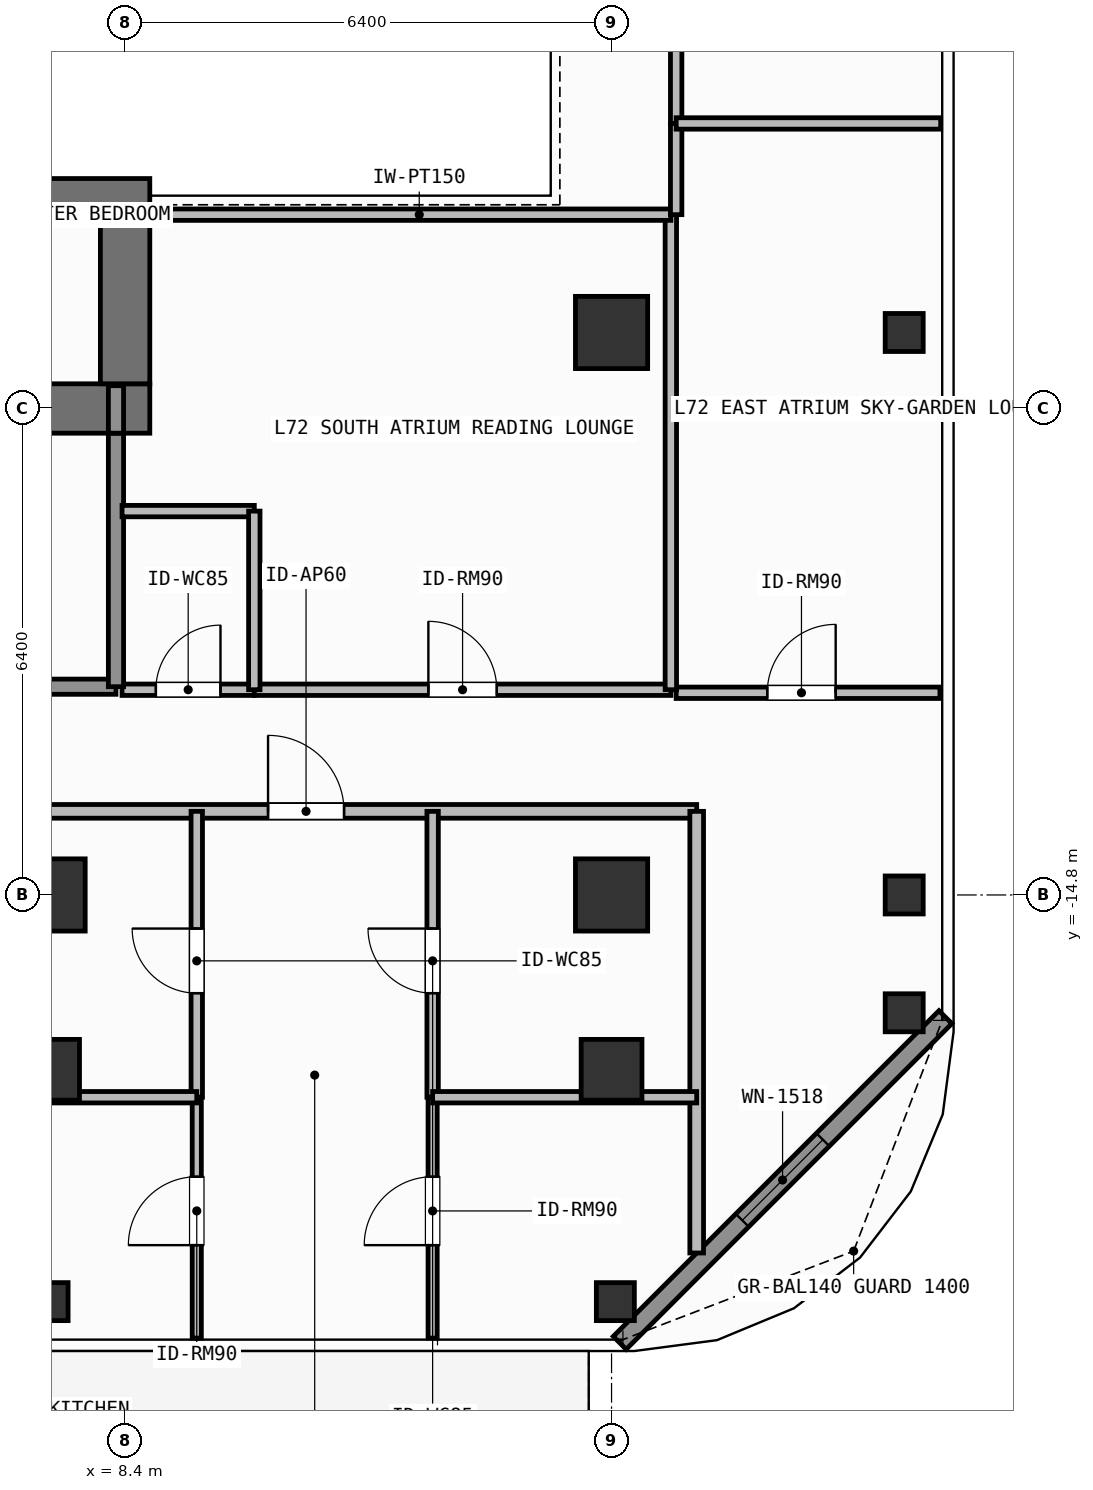
"""IFC4 building model, lengths in metres.
Left out: names, types, materials, properties, quantities, classifications, styles, units other than length and angle.
Written with IfcOpenShell. Run it as: python <this file> out.ifc"""

import sys

from ifc_helpers import new_model, si_unit, direction, frame, frame_2d, origin, origin_2d, place, context, subcontext, project, spatial, rectangle, hollow_rectangle, extrude, element, fill, save


model = new_model("IFC4")
c1 = context("Model", 3, precision=1e-05, world=origin(), true_north=direction((0.0, 1.0)))
c2 = subcontext(c1, "Body", "Model", "MODEL_VIEW")
j1 = project(units=[si_unit("LENGTHUNIT", "METRE"), si_unit("PLANEANGLEUNIT", "RADIAN")], contexts=[c1])
p1 = place(None, origin())
s1 = spatial("IfcSite", under=j1, at=p1, CompositionType="ELEMENT")
p2 = place(p1, origin())
s2 = spatial("IfcBuilding", under=s1, at=p2, CompositionType="ELEMENT")
p3 = place(p2, frame((0.0, 0.0, 293.7)))
s3 = spatial("IfcBuildingStorey", under=s2, at=p3, CompositionType="ELEMENT", Elevation=293.7)
p4 = place(p3, frame((6.12, -8.4, 0.0), z_axis=(0.0, 0.0, 1.0), x_axis=(1.0, 0.0, 0.0)))
e1 = element("IfcWall", 1, at=p4, inside=s3, PredefinedType="SHEAR", context=c2, shape_type="SweptSolid", body=[
    extrude(rectangle(XDim=2.605, YDim=0.65, at=frame_2d((1.302, 0.0))), origin(), (0.0, 0.0, 1.0), 3.9),
])
p5 = place(p3, frame((8.4, -8.075, 0.0), z_axis=(0.0, 0.0, 1.0), x_axis=(0.0, 1.0, 0.0)))
e2 = element("IfcWall", 2, at=p5, inside=s3, PredefinedType="SHEAR", context=c2, shape_type="SweptSolid", body=[
    extrude(rectangle(XDim=2.25, YDim=0.65, at=frame_2d((1.125, 0.0))), origin(), (0.0, 0.0, 1.0), 3.9),
])
p6 = place(p3, frame((3.045, -5.6, 0.0), z_axis=(0.0, 0.0, 1.0), x_axis=(1.0, 0.0, 0.0)))
e3 = element("IfcWall", 3, at=p6, inside=s3, PredefinedType="SHEAR", context=c2, shape_type="SweptSolid", body=[
    extrude(rectangle(XDim=5.68, YDim=0.45, at=frame_2d((2.84, 0.0))), origin(), (0.0, 0.0, 1.0), 3.9),
])
for number, where, z_axis, x_axis in (
    (4, (7.4, -14.8, 0.0), (0.0, 0.0, 1.0), (1.0, 0.0, 0.0)),
    (5, (14.8, -14.8, 0.0), (0.0, 0.0, 1.0), (1.0, 0.0, 0.0)),
    (6, (14.8, -7.4, 0.0), (0.0, 0.0, 1.0), (1.0, 0.0, 0.0)),
):
    element("IfcColumn", number, at=place(p3, frame(where, z_axis=z_axis, x_axis=x_axis)), inside=s3, PredefinedType="COLUMN", context=c2, shape_type="SweptSolid", body=[
        extrude(rectangle(XDim=0.95, YDim=0.95, at=origin_2d()), origin(), (0.0, 0.0, 1.0), 3.9),
    ])
for number, where, z_axis, x_axis in (
    (7, (7.4, -17.1, 0.0), (0.0, 0.0, 1.0), (1.0, 0.0, 0.0)),
    (8, (14.8, -17.1, 0.0), (0.0, 0.0, 1.0), (1.0, 0.0, 0.0)),
):
    element("IfcColumn", number, at=place(p3, frame(where, z_axis=z_axis, x_axis=x_axis)), inside=s3, PredefinedType="COLUMN", context=c2, shape_type="SweptSolid", body=[
        extrude(hollow_rectangle(XDim=0.8, YDim=0.8, WallThickness=0.036, at=origin_2d()), origin(), (0.0, 0.0, 1.0), 3.9),
    ])
for number, where, z_axis, x_axis in (
    (9, (14.85, -20.15, 0.0), (0.0, 0.0, 1.0), (1.0, 0.0, 0.0)),
    (10, (18.65, -16.35, 0.0), (0.0, 0.0, 1.0), (1.0, 0.0, 0.0)),
    (11, (7.4, -20.15, 0.0), (0.0, 0.0, 1.0), (1.0, 0.0, 0.0)),
    (12, (18.65, -14.8, 0.0), (0.0, 0.0, 1.0), (1.0, 0.0, 0.0)),
    (13, (18.65, -7.4, 0.0), (0.0, 0.0, 1.0), (1.0, 0.0, 0.0)),
):
    element("IfcColumn", number, at=place(p3, frame(where, z_axis=z_axis, x_axis=x_axis)), inside=s3, PredefinedType="COLUMN", context=c2, shape_type="SweptSolid", body=[
        extrude(hollow_rectangle(XDim=0.5, YDim=0.5, WallThickness=0.025, at=origin_2d()), origin(), (0.0, 0.0, 1.0), 3.9),
    ])
p7 = place(p3, frame((19.192, -16.408, 0.0), z_axis=(0.0, 0.0, 1.0), x_axis=(-0.707106781187, -0.707106781187, 0.0)))
e14 = element("IfcWall", 14, at=p7, inside=s3, PredefinedType="SOLIDWALL", context=c2, shape_type="SweptSolid", body=[
    extrude(rectangle(XDim=6.059, YDim=0.24, at=frame_2d((3.03, 0.0))), origin(), (0.0, 0.0, 1.0), 3.68),
])
p8 = place(p7, frame((2.28, 0.0, 0.8)))
e15 = element("IfcOpeningElement", 15, at=p8, cuts=e14, PredefinedType="OPENING", context=c2, shape_type="SweptSolid", body=[
    extrude(rectangle(XDim=1.5, YDim=1.85, at=frame_2d((0.75, 0.925))), frame((0.0, 0.13, 0.0), z_axis=(0.0, -1.0, 0.0), x_axis=(1.0, 0.0, 0.0)), (0.0, 0.0, 1.0), 0.26),
])
p9 = place(p3, frame((4.58, -12.06, 0.0), z_axis=(0.0, 0.0, 1.0), x_axis=(1.0, 0.0, 0.0)))
e16 = element("IfcWall", 16, at=p9, inside=s3, PredefinedType="SOLIDWALL", context=c2, shape_type="SweptSolid", body=[
    extrude(rectangle(XDim=3.7, YDim=0.2, at=frame_2d((1.85, 0.0))), origin(), (0.0, 0.0, 1.0), 3.68),
])
p10 = place(p9, frame((1.212, 0.0, 0.0)))
e17 = element("IfcOpeningElement", 17, at=p10, cuts=e16, PredefinedType="OPENING", context=c2, shape_type="SweptSolid", body=[
    extrude(rectangle(XDim=1.1, YDim=2.15, at=frame_2d((0.55, 1.075))), frame((0.0, 0.11, 0.0), z_axis=(0.0, -1.0, 0.0), x_axis=(1.0, 0.0, 0.0)), (0.0, 0.0, 1.0), 0.22),
])
p11 = place(p3, frame((8.36, -12.1, 0.0), z_axis=(0.0, 0.0, 1.0), x_axis=(1.0, 0.0, 0.0)))
e18 = element("IfcWall", 18, at=p11, inside=s3, PredefinedType="PARTITIONING", context=c2, shape_type="SweptSolid", body=[
    extrude(rectangle(XDim=1.74, YDim=0.15, at=frame_2d((0.87, 0.0))), origin(), (0.0, 0.0, 1.0), 3.68),
])
p12 = place(p11, frame((0.445, 0.0, 0.0)))
e19 = element("IfcOpeningElement", 19, at=p12, cuts=e18, PredefinedType="OPENING", context=c2, shape_type="SweptSolid", body=[
    extrude(rectangle(XDim=0.85, YDim=2.1, at=frame_2d((0.425, 1.05))), frame((0.0, 0.085, 0.0), z_axis=(0.0, -1.0, 0.0), x_axis=(1.0, 0.0, 0.0)), (0.0, 0.0, 1.0), 0.17),
])
p13 = place(p3, frame((10.1, -12.1, 0.0), z_axis=(0.0, 0.0, 1.0), x_axis=(1.0, 0.0, 0.0)))
e20 = element("IfcWall", 20, at=p13, inside=s3, PredefinedType="PARTITIONING", context=c2, shape_type="SweptSolid", body=[
    extrude(rectangle(XDim=5.48, YDim=0.15, at=frame_2d((2.74, 0.0))), origin(), (0.0, 0.0, 1.0), 3.68),
])
p14 = place(p13, frame((2.29, 0.0, 0.0)))
e21 = element("IfcOpeningElement", 21, at=p14, cuts=e20, PredefinedType="OPENING", context=c2, shape_type="SweptSolid", body=[
    extrude(rectangle(XDim=0.9, YDim=2.1, at=frame_2d((0.45, 1.05))), frame((0.0, 0.085, 0.0), z_axis=(0.0, -1.0, 0.0), x_axis=(1.0, 0.0, 0.0)), (0.0, 0.0, 1.0), 0.17),
])
p15 = place(p3, frame((5.283, -13.7, 0.0), z_axis=(0.0, 0.0, 1.0), x_axis=(1.0, 0.0, 0.0)))
e22 = element("IfcWall", 22, at=p15, inside=s3, PredefinedType="PARTITIONING", context=c2, shape_type="SweptSolid", body=[
    extrude(rectangle(XDim=10.637, YDim=0.18, at=frame_2d((5.318, 0.0))), origin(), (0.0, 0.0, 1.0), 3.68),
])
p16 = place(p15, frame((4.998, 0.0, 0.0)))
e23 = element("IfcOpeningElement", 23, at=p16, cuts=e22, PredefinedType="OPENING", context=c2, shape_type="SweptSolid", body=[
    extrude(rectangle(XDim=1.0, YDim=2.2, at=frame_2d((0.5, 1.1))), frame((0.0, 0.1, 0.0), z_axis=(0.0, -1.0, 0.0), x_axis=(1.0, 0.0, 0.0)), (0.0, 0.0, 1.0), 0.2),
])
p17 = place(p3, frame((9.343, -17.461, 0.0), z_axis=(0.0, 0.0, 1.0), x_axis=(0.0, 1.0, 0.0)))
e24 = element("IfcWall", 24, at=p17, inside=s3, PredefinedType="PARTITIONING", context=c2, shape_type="SweptSolid", body=[
    extrude(rectangle(XDim=3.761, YDim=0.15, at=frame_2d((1.88, 0.0))), origin(), (0.0, 0.0, 1.0), 3.68),
])
p18 = place(p17, frame((1.369, 0.0, 0.0)))
e25 = element("IfcOpeningElement", 25, at=p18, cuts=e24, PredefinedType="OPENING", context=c2, shape_type="SweptSolid", body=[
    extrude(rectangle(XDim=0.85, YDim=2.1, at=frame_2d((0.425, 1.05))), frame((0.0, 0.085, 0.0), z_axis=(0.0, -1.0, 0.0), x_axis=(1.0, 0.0, 0.0)), (0.0, 0.0, 1.0), 0.17),
])
p19 = place(p3, frame((9.343, -20.63, 0.0), z_axis=(0.0, 0.0, 1.0), x_axis=(0.0, 1.0, 0.0)))
e26 = element("IfcWall", 26, at=p19, inside=s3, PredefinedType="PARTITIONING", context=c2, shape_type="SweptSolid", body=[
    extrude(rectangle(XDim=3.169, YDim=0.12, at=frame_2d((1.584, 0.0))), origin(), (0.0, 0.0, 1.0), 3.68),
])
p20 = place(p19, frame((1.223, 0.0, 0.0)))
e27 = element("IfcOpeningElement", 27, at=p20, cuts=e26, PredefinedType="OPENING", context=c2, shape_type="SweptSolid", body=[
    extrude(rectangle(XDim=0.9, YDim=2.1, at=frame_2d((0.45, 1.05))), frame((0.0, 0.07, 0.0), z_axis=(0.0, -1.0, 0.0), x_axis=(1.0, 0.0, 0.0)), (0.0, 0.0, 1.0), 0.14),
])
p21 = place(p3, frame((12.446, -17.461, 0.0), z_axis=(0.0, 0.0, 1.0), x_axis=(0.0, 1.0, 0.0)))
e28 = element("IfcWall", 28, at=p21, inside=s3, PredefinedType="PARTITIONING", context=c2, shape_type="SweptSolid", body=[
    extrude(rectangle(XDim=3.761, YDim=0.15, at=frame_2d((1.88, 0.0))), origin(), (0.0, 0.0, 1.0), 3.68),
])
p22 = place(p21, frame((1.369, 0.0, 0.0)))
e29 = element("IfcOpeningElement", 29, at=p22, cuts=e28, PredefinedType="OPENING", context=c2, shape_type="SweptSolid", body=[
    extrude(rectangle(XDim=0.85, YDim=2.1, at=frame_2d((0.425, 1.05))), frame((0.0, 0.085, 0.0), z_axis=(0.0, -1.0, 0.0), x_axis=(1.0, 0.0, 0.0)), (0.0, 0.0, 1.0), 0.17),
])
p23 = place(p3, frame((12.446, -20.63, 0.0), z_axis=(0.0, 0.0, 1.0), x_axis=(0.0, 1.0, 0.0)))
e30 = element("IfcWall", 30, at=p23, inside=s3, PredefinedType="PARTITIONING", context=c2, shape_type="SweptSolid", body=[
    extrude(rectangle(XDim=3.169, YDim=0.12, at=frame_2d((1.584, 0.0))), origin(), (0.0, 0.0, 1.0), 3.68),
])
p24 = place(p23, frame((1.223, 0.0, 0.0)))
e31 = element("IfcOpeningElement", 31, at=p24, cuts=e30, PredefinedType="OPENING", context=c2, shape_type="SweptSolid", body=[
    extrude(rectangle(XDim=0.9, YDim=2.1, at=frame_2d((0.45, 1.05))), frame((0.0, 0.07, 0.0), z_axis=(0.0, -1.0, 0.0), x_axis=(1.0, 0.0, 0.0)), (0.0, 0.0, 1.0), 0.14),
])
p25 = place(p3, frame((15.65, -12.14, 0.0), z_axis=(0.0, 0.0, 1.0), x_axis=(1.0, 0.0, 0.0)))
e32 = element("IfcWall", 32, at=p25, inside=s3, PredefinedType="PARTITIONING", context=c2, shape_type="SweptSolid", body=[
    extrude(rectangle(XDim=3.47, YDim=0.15, at=frame_2d((1.735, 0.0))), origin(), (0.0, 0.0, 1.0), 3.68),
])
p26 = place(p25, frame((1.198, 0.0, 0.0)))
e33 = element("IfcOpeningElement", 33, at=p26, cuts=e32, PredefinedType="OPENING", context=c2, shape_type="SweptSolid", body=[
    extrude(rectangle(XDim=0.9, YDim=2.1, at=frame_2d((0.45, 1.05))), frame((0.0, 0.085, 0.0), z_axis=(0.0, -1.0, 0.0), x_axis=(1.0, 0.0, 0.0)), (0.0, 0.0, 1.0), 0.17),
])
p27 = place(p3, frame((8.28, -12.06, 0.0), z_axis=(0.0, 0.0, 1.0), x_axis=(0.0, 1.0, 0.0)))
e34 = element("IfcWall", 34, at=p27, inside=s3, PredefinedType="SOLIDWALL", context=c2, shape_type="SweptSolid", body=[
    extrude(rectangle(XDim=3.335, YDim=0.2, at=frame_2d((1.667, 0.0))), origin(), (0.0, 0.0, 1.0), 3.68),
])
p28 = place(p3, frame((8.28, -8.725, 0.0), z_axis=(0.0, 0.0, 1.0), x_axis=(0.0, 1.0, 0.0)))
e35 = element("IfcWall", 35, at=p28, inside=s3, PredefinedType="SOLIDWALL", context=c2, shape_type="SweptSolid", body=[
    extrude(rectangle(XDim=0.625, YDim=0.2, at=frame_2d((0.312, 0.0))), origin(), (0.0, 0.0, 1.0), 3.68),
])
p29 = place(p3, frame((8.36, -9.75, 0.0), z_axis=(0.0, 0.0, 1.0), x_axis=(1.0, 0.0, 0.0)))
e36 = element("IfcWall", 36, at=p29, inside=s3, PredefinedType="PARTITIONING", context=c2, shape_type="SweptSolid", body=[
    extrude(rectangle(XDim=1.74, YDim=0.15, at=frame_2d((0.87, 0.0))), origin(), (0.0, 0.0, 1.0), 3.68),
])
p30 = place(p3, frame((10.1, -12.1, 0.0), z_axis=(0.0, 0.0, 1.0), x_axis=(0.0, 1.0, 0.0)))
e37 = element("IfcWall", 37, at=p30, inside=s3, PredefinedType="PARTITIONING", context=c2, shape_type="SweptSolid", body=[
    extrude(rectangle(XDim=2.35, YDim=0.15, at=frame_2d((1.175, 0.0))), origin(), (0.0, 0.0, 1.0), 3.68),
])
p31 = place(p3, frame((15.58, -12.1, 0.0), z_axis=(0.0, 0.0, 1.0), x_axis=(0.0, 1.0, 0.0)))
e38 = element("IfcWall", 38, at=p31, inside=s3, PredefinedType="PARTITIONING", context=c2, shape_type="SweptSolid", body=[
    extrude(rectangle(XDim=6.25, YDim=0.15, at=frame_2d((3.125, 0.0))), origin(), (0.0, 0.0, 1.0), 3.68),
])
p32 = place(p3, frame((8.96, -5.85, 0.0), z_axis=(0.0, 0.0, 1.0), x_axis=(1.0, 0.0, 0.0)))
e39 = element("IfcWall", 39, at=p32, inside=s3, PredefinedType="PARTITIONING", context=c2, shape_type="SweptSolid", body=[
    extrude(rectangle(XDim=6.62, YDim=0.15, at=frame_2d((3.31, 0.0))), origin(), (0.0, 0.0, 1.0), 3.68),
])
p33 = place(p3, frame((15.92, -19.51, 0.0), z_axis=(0.0, 0.0, 1.0), x_axis=(0.0, 1.0, 0.0)))
e40 = element("IfcWall", 40, at=p33, inside=s3, PredefinedType="PARTITIONING", context=c2, shape_type="SweptSolid", body=[
    extrude(rectangle(XDim=5.81, YDim=0.18, at=frame_2d((2.905, 0.0))), origin(), (0.0, 0.0, 1.0), 3.68),
])
p34 = place(p3, frame((5.283, -17.461, 0.0), z_axis=(0.0, 0.0, 1.0), x_axis=(1.0, 0.0, 0.0)))
e41 = element("IfcWall", 41, at=p34, inside=s3, PredefinedType="PARTITIONING", context=c2, shape_type="SweptSolid", body=[
    extrude(rectangle(XDim=4.06, YDim=0.15, at=frame_2d((2.03, 0.0))), origin(), (0.0, 0.0, 1.0), 3.68),
])
p35 = place(p3, frame((12.446, -17.461, 0.0), z_axis=(0.0, 0.0, 1.0), x_axis=(1.0, 0.0, 0.0)))
e42 = element("IfcWall", 42, at=p35, inside=s3, PredefinedType="PARTITIONING", context=c2, shape_type="SweptSolid", body=[
    extrude(rectangle(XDim=3.474, YDim=0.15, at=frame_2d((1.737, 0.0))), origin(), (0.0, 0.0, 1.0), 3.68),
])
p36 = place(p3, frame((15.65, -5.85, 0.0), z_axis=(0.0, 0.0, 1.0), x_axis=(0.0, 1.0, 0.0)))
e43 = element("IfcWall", 43, at=p36, inside=s3, PredefinedType="PARTITIONING", context=c2, shape_type="SweptSolid", body=[
    extrude(rectangle(XDim=1.2, YDim=0.15, at=frame_2d((0.6, 0.0))), origin(), (0.0, 0.0, 1.0), 3.68),
])
p37 = place(p3, frame((15.65, -4.65, 0.0), z_axis=(0.0, 0.0, 1.0), x_axis=(0.0, 1.0, 0.0)))
e44 = element("IfcWall", 44, at=p37, inside=s3, PredefinedType="PARTITIONING", context=c2, shape_type="SweptSolid", body=[
    extrude(rectangle(XDim=10.5, YDim=0.15, at=frame_2d((5.25, 0.0))), origin(), (0.0, 0.0, 1.0), 3.68),
])
p38 = place(p3, frame((15.65, -4.65, 0.0), z_axis=(0.0, 0.0, 1.0), x_axis=(1.0, 0.0, 0.0)))
e45 = element("IfcWall", 45, at=p38, inside=s3, PredefinedType="PARTITIONING", context=c2, shape_type="SweptSolid", body=[
    extrude(rectangle(XDim=3.48, YDim=0.15, at=frame_2d((1.74, 0.0))), origin(), (0.0, 0.0, 1.0), 3.68),
])
p39 = place(p8, origin())
e46 = element("IfcWindow", 46, at=p39, inside=s3, PartitioningType="SINGLE_PANEL", PredefinedType="WINDOW", context=c2, shape_type="SweptSolid", body=[
    extrude(rectangle(XDim=1.5, YDim=1.85, at=frame_2d((0.75, 0.925))), frame((0.0, 0.03, 0.0), z_axis=(0.0, -1.0, 0.0), x_axis=(1.0, 0.0, 0.0)), (0.0, 0.0, 1.0), 0.06),
])
fill(e15, e46)
p40 = place(p12, origin())
e47 = element("IfcDoor", 47, at=p40, inside=s3, OperationType="SINGLE_SWING_RIGHT", PredefinedType="DOOR", context=c2, shape_type="SweptSolid", body=[
    extrude(rectangle(XDim=0.85, YDim=2.1, at=frame_2d((0.425, 1.05))), frame((0.0, 0.025, 0.0), z_axis=(0.0, -1.0, 0.0), x_axis=(1.0, 0.0, 0.0)), (0.0, 0.0, 1.0), 0.05),
])
fill(e19, e47)
p41 = place(p14, origin())
e48 = element("IfcDoor", 48, at=p41, inside=s3, OperationType="SINGLE_SWING_LEFT", PredefinedType="DOOR", context=c2, shape_type="SweptSolid", body=[
    extrude(rectangle(XDim=0.9, YDim=2.1, at=frame_2d((0.45, 1.05))), frame((0.0, 0.025, 0.0), z_axis=(0.0, -1.0, 0.0), x_axis=(1.0, 0.0, 0.0)), (0.0, 0.0, 1.0), 0.05),
])
fill(e21, e48)
p42 = place(p16, origin())
e49 = element("IfcDoor", 49, at=p42, inside=s3, OperationType="SINGLE_SWING_LEFT", PredefinedType="DOOR", context=c2, shape_type="SweptSolid", body=[
    extrude(rectangle(XDim=1.0, YDim=2.2, at=frame_2d((0.5, 1.1))), frame((0.0, 0.025, 0.0), z_axis=(0.0, -1.0, 0.0), x_axis=(1.0, 0.0, 0.0)), (0.0, 0.0, 1.0), 0.05),
])
fill(e23, e49)
p43 = place(p18, origin())
e50 = element("IfcDoor", 50, at=p43, inside=s3, OperationType="SINGLE_SWING_RIGHT", PredefinedType="DOOR", context=c2, shape_type="SweptSolid", body=[
    extrude(rectangle(XDim=0.85, YDim=2.1, at=frame_2d((0.425, 1.05))), frame((0.0, 0.025, 0.0), z_axis=(0.0, -1.0, 0.0), x_axis=(1.0, 0.0, 0.0)), (0.0, 0.0, 1.0), 0.05),
])
fill(e25, e50)
p44 = place(p20, origin())
e51 = element("IfcDoor", 51, at=p44, inside=s3, OperationType="SINGLE_SWING_LEFT", PredefinedType="DOOR", context=c2, shape_type="SweptSolid", body=[
    extrude(rectangle(XDim=0.9, YDim=2.1, at=frame_2d((0.45, 1.05))), frame((0.0, 0.025, 0.0), z_axis=(0.0, -1.0, 0.0), x_axis=(1.0, 0.0, 0.0)), (0.0, 0.0, 1.0), 0.05),
])
fill(e27, e51)
p45 = place(p22, origin())
e52 = element("IfcDoor", 52, at=p45, inside=s3, OperationType="SINGLE_SWING_RIGHT", PredefinedType="DOOR", context=c2, shape_type="SweptSolid", body=[
    extrude(rectangle(XDim=0.85, YDim=2.1, at=frame_2d((0.425, 1.05))), frame((0.0, 0.025, 0.0), z_axis=(0.0, -1.0, 0.0), x_axis=(1.0, 0.0, 0.0)), (0.0, 0.0, 1.0), 0.05),
])
fill(e29, e52)
p46 = place(p24, origin())
e53 = element("IfcDoor", 53, at=p46, inside=s3, OperationType="SINGLE_SWING_LEFT", PredefinedType="DOOR", context=c2, shape_type="SweptSolid", body=[
    extrude(rectangle(XDim=0.9, YDim=2.1, at=frame_2d((0.45, 1.05))), frame((0.0, 0.025, 0.0), z_axis=(0.0, -1.0, 0.0), x_axis=(1.0, 0.0, 0.0)), (0.0, 0.0, 1.0), 0.05),
])
fill(e31, e53)
p47 = place(p26, origin())
e54 = element("IfcDoor", 54, at=p47, inside=s3, OperationType="SINGLE_SWING_RIGHT", PredefinedType="DOOR", context=c2, shape_type="SweptSolid", body=[
    extrude(rectangle(XDim=0.9, YDim=2.1, at=frame_2d((0.45, 1.05))), frame((0.0, 0.025, 0.0), z_axis=(0.0, -1.0, 0.0), x_axis=(1.0, 0.0, 0.0)), (0.0, 0.0, 1.0), 0.05),
])
fill(e33, e54)
save(model, sys.argv[1])
